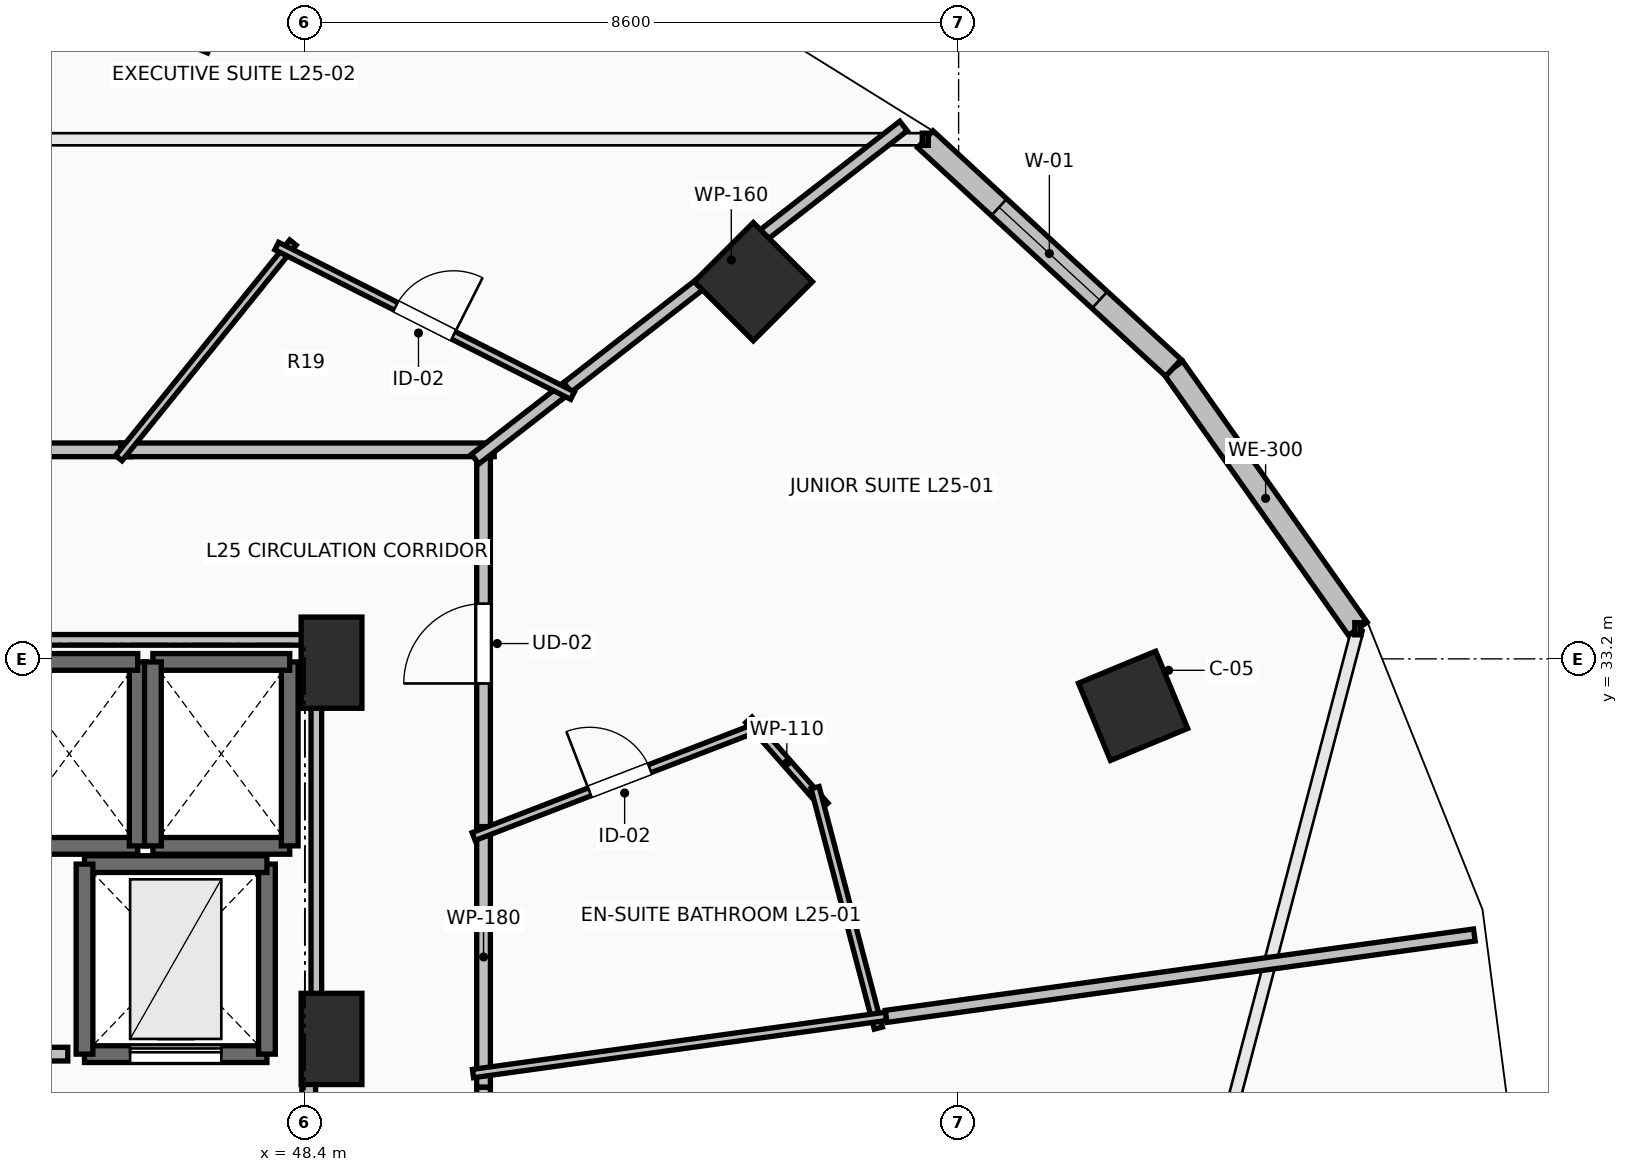
"""IFC4 building model, lengths in metres.
Left out: names, types, materials, properties, quantities, classifications, styles, units other than length and angle.
Written with IfcOpenShell. Run it as: python <this file> out.ifc"""

import sys

from ifc_helpers import new_model, si_unit, direction, frame, frame_2d, origin, origin_2d, place, context, subcontext, project, spatial, rectangle, extrude, element, fill, save


model = new_model("IFC4")
c1 = context("Model", 3, precision=1e-05, world=origin(), true_north=direction((0.0, 1.0)))
c2 = subcontext(c1, "Body", "Model", "MODEL_VIEW")
j1 = project(units=[si_unit("LENGTHUNIT", "METRE"), si_unit("PLANEANGLEUNIT", "RADIAN")], contexts=[c1])
p1 = place(None, origin())
s1 = spatial("IfcSite", under=j1, at=p1, CompositionType="ELEMENT")
p2 = place(p1, origin())
s2 = spatial("IfcBuilding", under=s1, at=p2, CompositionType="ELEMENT")
p3 = place(p2, frame((0.0, 0.0, 96.3)))
s3 = spatial("IfcBuildingStorey", under=s2, at=p3, CompositionType="ELEMENT", Elevation=96.3)
for number, where, z_axis, x_axis in (
    (1, (59.295, 32.582, 0.0), (0.0, 0.0, 1.0), (0.924, 0.383, 0.0)),
    (2, (54.299, 38.162, 0.0), (0.0, 0.0, 1.0), (0.707, 0.707, 0.0)),
    (3, (46.821, 41.891, 0.0), (0.0, 0.0, 1.0), (0.383, 0.924, 0.0)),
):
    element("IfcColumn", number, at=place(p3, frame(where, z_axis=z_axis, x_axis=x_axis)), inside=s3, PredefinedType="COLUMN", context=c2, shape_type="SweptSolid", body=[
        extrude(rectangle(XDim=1.1, YDim=1.1, at=origin_2d()), origin(), (0.0, 0.0, 1.0), 3.5),
    ])
for number, where, z_axis, x_axis in (
    (4, (48.75, 33.15, 0.0), (0.0, 0.0, 1.0), (1.0, 0.0, 0.0)),
    (5, (48.75, 28.2, 0.0), (0.0, 0.0, 1.0), (1.0, 0.0, 0.0)),
):
    element("IfcColumn", number, at=place(p3, frame(where, z_axis=z_axis, x_axis=x_axis)), inside=s3, PredefinedType="PILASTER", context=c2, shape_type="SweptSolid", body=[
        extrude(rectangle(XDim=0.8, YDim=1.2, at=origin_2d()), origin(), (0.0, 0.0, 1.0), 3.5),
    ])
p4 = place(p3, frame((62.252, 33.596, 0.0), z_axis=(0.0, 0.0, 1.0), x_axis=(-0.57716435238, 0.81662801222, 0.0)))
e6 = element("IfcWall", 6, at=p4, inside=s3, PredefinedType="STANDARD", context=c2, shape_type="SweptSolid", body=[
    extrude(rectangle(XDim=4.202, YDim=0.3, at=frame_2d((2.101, 0.0))), origin(), (0.0, 0.0, 1.0), 3.24),
])
p5 = place(p3, frame((59.826, 37.028, 0.0), z_axis=(0.0, 0.0, 1.0), x_axis=(-0.735416718093, 0.677615119924, 0.0)))
e7 = element("IfcWall", 7, at=p5, inside=s3, PredefinedType="STANDARD", context=c2, shape_type="SweptSolid", body=[
    extrude(rectangle(XDim=4.439, YDim=0.3, at=frame_2d((2.22, 0.0))), origin(), (0.0, 0.0, 1.0), 3.24),
])
p6 = place(p5, frame((1.32, 0.0, 0.85)))
e8 = element("IfcOpeningElement", 8, at=p6, cuts=e7, PredefinedType="OPENING", context=c2, shape_type="SweptSolid", body=[
    extrude(rectangle(XDim=1.8, YDim=2.19, at=frame_2d((0.9, 1.095))), frame((0.0, 0.165, 0.0), z_axis=(0.0, -1.0, 0.0), x_axis=(1.0, 0.0, 0.0)), (0.0, 0.0, 1.0), 0.33),
])
p7 = place(p3, frame((44.4, 30.74, 0.0), z_axis=(0.0, 0.0, 1.0), x_axis=(1.0, 0.0, 0.0)))
e9 = element("IfcWall", 9, at=p7, inside=s3, PredefinedType="SOLIDWALL", context=c2, shape_type="SweptSolid", body=[
    extrude(rectangle(XDim=1.8, YDim=0.22, at=frame_2d((0.9, 0.0))), origin(), (0.0, 0.0, 1.0), 3.24),
])
p8 = place(p3, frame((46.2, 30.74, 0.0), z_axis=(0.0, 0.0, 1.0), x_axis=(0.0, 1.0, 0.0)))
e10 = element("IfcWall", 10, at=p8, inside=s3, PredefinedType="SOLIDWALL", context=c2, shape_type="SweptSolid", body=[
    extrude(rectangle(XDim=2.42, YDim=0.22, at=frame_2d((1.21, 0.0))), origin(), (0.0, 0.0, 1.0), 3.24),
])
for number, where, z_axis, x_axis in (
    (11, (46.2, 33.16, 0.0), (0.0, 0.0, 1.0), (-1.0, 0.0, 0.0)),
    (12, (46.4, 30.74, 0.0), (0.0, 0.0, 1.0), (1.0, 0.0, 0.0)),
):
    element("IfcWall", number, at=place(p3, frame(where, z_axis=z_axis, x_axis=x_axis)), inside=s3, PredefinedType="SOLIDWALL", context=c2, shape_type="SweptSolid", body=[
        extrude(rectangle(XDim=1.8, YDim=0.22, at=frame_2d((0.9, 0.0))), origin(), (0.0, 0.0, 1.0), 3.24),
    ])
p9 = place(p3, frame((48.2, 30.74, 0.0), z_axis=(0.0, 0.0, 1.0), x_axis=(0.0, 1.0, 0.0)))
e13 = element("IfcWall", 13, at=p9, inside=s3, PredefinedType="SOLIDWALL", context=c2, shape_type="SweptSolid", body=[
    extrude(rectangle(XDim=2.42, YDim=0.22, at=frame_2d((1.21, 0.0))), origin(), (0.0, 0.0, 1.0), 3.24),
])
p10 = place(p3, frame((48.2, 33.16, 0.0), z_axis=(0.0, 0.0, 1.0), x_axis=(-1.0, 0.0, 0.0)))
e14 = element("IfcWall", 14, at=p10, inside=s3, PredefinedType="SOLIDWALL", context=c2, shape_type="SweptSolid", body=[
    extrude(rectangle(XDim=1.8, YDim=0.22, at=frame_2d((0.9, 0.0))), origin(), (0.0, 0.0, 1.0), 3.24),
])
p11 = place(p3, frame((46.4, 33.16, 0.0), z_axis=(0.0, 0.0, 1.0), x_axis=(0.0, -1.0, 0.0)))
e15 = element("IfcWall", 15, at=p11, inside=s3, PredefinedType="SOLIDWALL", context=c2, shape_type="SweptSolid", body=[
    extrude(rectangle(XDim=2.42, YDim=0.22, at=frame_2d((1.21, 0.0))), origin(), (0.0, 0.0, 1.0), 3.24),
])
p12 = place(p3, frame((45.5, 28.0, 0.0), z_axis=(0.0, 0.0, 1.0), x_axis=(1.0, 0.0, 0.0)))
e16 = element("IfcWall", 16, at=p12, inside=s3, PredefinedType="SHEAR", context=c2, shape_type="SweptSolid", body=[
    extrude(rectangle(XDim=2.4, YDim=0.22, at=frame_2d((1.2, 0.0))), origin(), (0.0, 0.0, 1.0), 3.24),
])
p13 = place(p12, frame((0.6, 0.0, 0.0)))
e17 = element("IfcOpeningElement", 17, at=p13, cuts=e16, PredefinedType="OPENING", context=c2, shape_type="SweptSolid", body=[
    extrude(rectangle(XDim=1.2, YDim=2.2, at=frame_2d((0.6, 1.1))), frame((0.0, 0.125, 0.0), z_axis=(0.0, -1.0, 0.0), x_axis=(1.0, 0.0, 0.0)), (0.0, 0.0, 1.0), 0.25),
])
p14 = place(p3, frame((47.9, 28.0, 0.0), z_axis=(0.0, 0.0, 1.0), x_axis=(0.0, 1.0, 0.0)))
e18 = element("IfcWall", 18, at=p14, inside=s3, PredefinedType="SHEAR", context=c2, shape_type="SweptSolid", body=[
    extrude(rectangle(XDim=2.5, YDim=0.22, at=frame_2d((1.25, 0.0))), origin(), (0.0, 0.0, 1.0), 3.24),
])
p15 = place(p3, frame((47.9, 30.5, 0.0), z_axis=(0.0, 0.0, 1.0), x_axis=(-1.0, 0.0, 0.0)))
e19 = element("IfcWall", 19, at=p15, inside=s3, PredefinedType="SHEAR", context=c2, shape_type="SweptSolid", body=[
    extrude(rectangle(XDim=2.4, YDim=0.22, at=frame_2d((1.2, 0.0))), origin(), (0.0, 0.0, 1.0), 3.24),
])
p16 = place(p3, frame((45.5, 30.5, 0.0), z_axis=(0.0, 0.0, 1.0), x_axis=(0.0, -1.0, 0.0)))
e20 = element("IfcWall", 20, at=p16, inside=s3, PredefinedType="SHEAR", context=c2, shape_type="SweptSolid", body=[
    extrude(rectangle(XDim=2.5, YDim=0.22, at=frame_2d((1.25, 0.0))), origin(), (0.0, 0.0, 1.0), 3.24),
])
p17 = place(p3, frame((48.45, 23.95, 0.0), z_axis=(0.0, 0.0, 1.0), x_axis=(0.0, 1.0, 0.0)))
e21 = element("IfcWall", 21, at=p17, inside=s3, PredefinedType="PARTITIONING", context=c2, shape_type="SweptSolid", body=[
    extrude(rectangle(XDim=4.05, YDim=0.18, at=frame_2d((2.025, 0.0))), origin(), (0.0, 0.0, 1.0), 3.24),
])
p18 = place(p17, frame((1.425, 0.0, 0.0)))
e22 = element("IfcOpeningElement", 22, at=p18, cuts=e21, PredefinedType="OPENING", context=c2, shape_type="SweptSolid", body=[
    extrude(rectangle(XDim=1.2, YDim=2.15, at=frame_2d((0.6, 1.075))), frame((0.0, 0.105, 0.0), z_axis=(0.0, -1.0, 0.0), x_axis=(1.0, 0.0, 0.0)), (0.0, 0.0, 1.0), 0.21),
])
p19 = place(p3, frame((50.75, 30.853, 0.0), z_axis=(0.0, 0.0, 1.0), x_axis=(0.0, 1.0, 0.0)))
e23 = element("IfcWall", 23, at=p19, inside=s3, PredefinedType="PARTITIONING", context=c2, shape_type="SweptSolid", body=[
    extrude(rectangle(XDim=5.097, YDim=0.18, at=frame_2d((2.548, 0.0))), origin(), (0.0, 0.0, 1.0), 2.432),
])
p20 = place(p19, frame((2.023, 0.0, 0.0)))
e24 = element("IfcOpeningElement", 24, at=p20, cuts=e23, PredefinedType="OPENING", context=c2, shape_type="SweptSolid", body=[
    extrude(rectangle(XDim=1.05, YDim=2.2, at=frame_2d((0.525, 1.1))), frame((0.0, 0.105, 0.0), z_axis=(0.0, -1.0, 0.0), x_axis=(1.0, 0.0, 0.0)), (0.0, 0.0, 1.0), 0.21),
])
p21 = place(p3, frame((50.75, 27.564, 0.0), z_axis=(0.0, 0.0, 1.0), x_axis=(0.0, 1.0, 0.0)))
e25 = element("IfcWall", 25, at=p21, inside=s3, PredefinedType="PARTITIONING", context=c2, shape_type="SweptSolid", body=[
    extrude(rectangle(XDim=3.429, YDim=0.18, at=frame_2d((1.714, 0.0))), origin(), (0.0, 0.0, 1.0), 2.432),
])
p22 = place(p3, frame((46.116, 35.95, 0.0), z_axis=(0.0, 0.0, 1.0), x_axis=(-1.0, 0.0, 0.0)))
e26 = element("IfcWall", 26, at=p22, inside=s3, PredefinedType="PARTITIONING", context=c2, shape_type="SweptSolid", body=[
    extrude(rectangle(XDim=4.128, YDim=0.18, at=frame_2d((2.064, 0.0))), origin(), (0.0, 0.0, 1.0), 2.972),
])
p23 = place(p22, frame((1.539, 0.0, 0.0)))
e27 = element("IfcOpeningElement", 27, at=p23, cuts=e26, PredefinedType="OPENING", context=c2, shape_type="SweptSolid", body=[
    extrude(rectangle(XDim=1.05, YDim=2.2, at=frame_2d((0.525, 1.1))), frame((0.0, 0.105, 0.0), z_axis=(0.0, -1.0, 0.0), x_axis=(1.0, 0.0, 0.0)), (0.0, 0.0, 1.0), 0.21),
])
p24 = place(p3, frame((50.89, 35.95, 0.0), z_axis=(0.0, 0.0, 1.0), x_axis=(-1.0, 0.0, 0.0)))
e28 = element("IfcWall", 28, at=p24, inside=s3, PredefinedType="PARTITIONING", context=c2, shape_type="SweptSolid", body=[
    extrude(rectangle(XDim=4.914, YDim=0.18, at=frame_2d((2.457, 0.0))), origin(), (0.0, 0.0, 1.0), 2.432),
])
p25 = place(p3, frame((50.75, 16.409, 0.0), z_axis=(0.0, 0.0, 1.0), x_axis=(0.0, 1.0, 0.0)))
e29 = element("IfcWall", 29, at=p25, inside=s3, PredefinedType="PARTITIONING", context=c2, shape_type="SweptSolid", body=[
    extrude(rectangle(XDim=11.155, YDim=0.18, at=frame_2d((5.578, 0.0))), origin(), (0.0, 0.0, 1.0), 2.432),
])
p26 = place(p25, frame((5.077, 0.0, 0.0)))
e30 = element("IfcOpeningElement", 30, at=p26, cuts=e29, PredefinedType="OPENING", context=c2, shape_type="SweptSolid", body=[
    extrude(rectangle(XDim=1.0, YDim=2.15, at=frame_2d((0.5, 1.075))), frame((0.0, 0.105, 0.0), z_axis=(0.0, -1.0, 0.0), x_axis=(1.0, 0.0, 0.0)), (0.0, 0.0, 1.0), 0.21),
])
p27 = place(p3, frame((54.24, 32.398, 0.0), z_axis=(0.0, 0.0, 1.0), x_axis=(0.661931735756, -0.749564124808, 0.0)))
e31 = element("IfcWall", 31, at=p27, inside=s3, PredefinedType="PARTITIONING", context=c2, shape_type="SweptSolid", body=[
    extrude(rectangle(XDim=1.51, YDim=0.11, at=frame_2d((0.755, 0.0))), origin(), (0.0, 0.0, 1.0), 3.24),
])
p28 = place(p3, frame((55.111, 31.506, 0.0), z_axis=(0.0, 0.0, 1.0), x_axis=(0.254405137241, -0.967097733502, 0.0)))
e32 = element("IfcWall", 32, at=p28, inside=s3, PredefinedType="PARTITIONING", context=c2, shape_type="SweptSolid", body=[
    extrude(rectangle(XDim=3.271, YDim=0.11, at=frame_2d((1.636, 0.0))), origin(), (0.0, 0.0, 1.0), 2.922),
])
p29 = place(p3, frame((56.047, 28.497, 0.0), z_axis=(0.0, 0.0, 1.0), x_axis=(-0.990553307294, -0.137128207927, 0.0)))
e33 = element("IfcWall", 33, at=p29, inside=s3, PredefinedType="PARTITIONING", context=c2, shape_type="SweptSolid", body=[
    extrude(rectangle(XDim=5.487, YDim=0.11, at=frame_2d((2.744, 0.0))), origin(), (0.0, 0.0, 1.0), 2.432),
])
p30 = place(p3, frame((50.619, 30.863, 0.0), z_axis=(0.0, 0.0, 1.0), x_axis=(0.933189718051, 0.359384126144, 0.0)))
e34 = element("IfcWall", 34, at=p30, inside=s3, PredefinedType="PARTITIONING", context=c2, shape_type="SweptSolid", body=[
    extrude(rectangle(XDim=4.119, YDim=0.11, at=frame_2d((2.06, 0.0))), origin(), (0.0, 0.0, 1.0), 2.972),
])
p31 = place(p30, frame((1.635, 0.0, 0.0)))
e35 = element("IfcOpeningElement", 35, at=p31, cuts=e34, PredefinedType="OPENING", context=c2, shape_type="SweptSolid", body=[
    extrude(rectangle(XDim=0.85, YDim=2.1, at=frame_2d((0.425, 1.05))), frame((0.0, 0.07, 0.0), z_axis=(0.0, -1.0, 0.0), x_axis=(1.0, 0.0, 0.0)), (0.0, 0.0, 1.0), 0.14),
])
p32 = place(p3, frame((56.275, 40.21, 0.0), z_axis=(0.0, 0.0, 1.0), x_axis=(-0.78943235806, -0.613837561614, 0.0)))
e36 = element("IfcWall", 36, at=p32, inside=s3, PredefinedType="PARTITIONING", context=c2, shape_type="SweptSolid", body=[
    extrude(rectangle(XDim=5.741, YDim=0.16, at=frame_2d((2.87, 0.0))), origin(), (0.0, 0.0, 1.0), 2.677),
])
p33 = place(p3, frame((51.854, 36.772, 0.0), z_axis=(0.0, 0.0, 1.0), x_axis=(-0.789420593357, -0.613852691436, 0.0)))
e37 = element("IfcWall", 37, at=p33, inside=s3, PredefinedType="PARTITIONING", context=c2, shape_type="SweptSolid", body=[
    extrude(rectangle(XDim=1.538, YDim=0.16, at=frame_2d((0.769, 0.0))), origin(), (0.0, 0.0, 1.0), 2.922),
])
p34 = place(p3, frame((56.047, 28.497, 0.0), z_axis=(0.0, 0.0, 1.0), x_axis=(0.990569127114, 0.137013883997, 0.0)))
e38 = element("IfcWall", 38, at=p34, inside=s3, PredefinedType="PARTITIONING", context=c2, shape_type="SweptSolid", body=[
    extrude(rectangle(XDim=7.812, YDim=0.16, at=frame_2d((3.906, 0.0))), origin(), (0.0, 0.0, 1.0), 2.677),
])
p35 = place(p3, frame((45.951, 35.841, 0.0), z_axis=(0.0, 0.0, 1.0), x_axis=(0.628411924203, 0.77788074505, 0.0)))
e39 = element("IfcWall", 39, at=p35, inside=s3, PredefinedType="PARTITIONING", context=c2, shape_type="SweptSolid", body=[
    extrude(rectangle(XDim=3.646, YDim=0.11, at=frame_2d((1.823, 0.0))), origin(), (0.0, 0.0, 1.0), 2.432),
])
p36 = place(p3, frame((48.029, 38.631, 0.0), z_axis=(0.0, 0.0, 1.0), x_axis=(0.892459125519, -0.451128262558, 0.0)))
e40 = element("IfcWall", 40, at=p36, inside=s3, PredefinedType="PARTITIONING", context=c2, shape_type="SweptSolid", body=[
    extrude(rectangle(XDim=4.361, YDim=0.11, at=frame_2d((2.18, 0.0))), origin(), (0.0, 0.0, 1.0), 3.24),
])
p37 = place(p36, frame((1.755, 0.0, 0.0)))
e41 = element("IfcOpeningElement", 41, at=p37, cuts=e40, PredefinedType="OPENING", context=c2, shape_type="SweptSolid", body=[
    extrude(rectangle(XDim=0.85, YDim=2.1, at=frame_2d((0.425, 1.05))), frame((0.0, 0.07, 0.0), z_axis=(0.0, -1.0, 0.0), x_axis=(1.0, 0.0, 0.0)), (0.0, 0.0, 1.0), 0.14),
])
p38 = place(p3, frame((45.682, 44.88, 0.0), z_axis=(0.0, 0.0, 1.0), x_axis=(-0.376911553655, -0.9262492541, 0.0)))
e42 = element("IfcWall", 42, at=p38, inside=s3, PredefinedType="PARTITIONING", context=c2, shape_type="SweptSolid", body=[
    extrude(rectangle(XDim=9.641, YDim=0.16, at=frame_2d((4.82, 0.0))), origin(), (0.0, 0.0, 1.0), 2.677),
])
p39 = place(p3, frame((45.28, 28.0, 0.0), z_axis=(0.0, 0.0, 1.0), x_axis=(-1.0, 0.0, 0.0)))
e43 = element("IfcWall", 43, at=p39, inside=s3, PredefinedType="PARTITIONING", context=c2, shape_type="SweptSolid", body=[
    extrude(rectangle(XDim=0.915, YDim=0.18, at=frame_2d((0.458, 0.0))), origin(), (0.0, 0.0, 1.0), 3.24),
])
p40 = place(p3, frame((44.34, 33.45, 0.0), z_axis=(0.0, 0.0, 1.0), x_axis=(1.0, 0.0, 0.0)))
e44 = element("IfcWall", 44, at=p40, inside=s3, PredefinedType="PARTITIONING", context=c2, shape_type="SweptSolid", body=[
    extrude(rectangle(XDim=4.21, YDim=0.14, at=frame_2d((2.105, 0.0))), origin(), (0.0, 0.0, 1.0), 2.432),
])
p41 = place(p3, frame((48.55, 33.45, 0.0), z_axis=(0.0, 0.0, 1.0), x_axis=(0.0, -1.0, 0.0)))
e45 = element("IfcWall", 45, at=p41, inside=s3, PredefinedType="PARTITIONING", context=c2, shape_type="SweptSolid", body=[
    extrude(rectangle(XDim=5.254, YDim=0.14, at=frame_2d((2.627, 0.0))), origin(), (0.0, 0.0, 1.0), 2.432),
])
p42 = place(p6, origin())
e46 = element("IfcWindow", 46, at=p42, inside=s3, PartitioningType="SINGLE_PANEL", PredefinedType="WINDOW", context=c2, shape_type="SweptSolid", body=[
    extrude(rectangle(XDim=1.8, YDim=2.19, at=frame_2d((0.9, 1.095))), frame((0.0, 0.03, 0.0), z_axis=(0.0, -1.0, 0.0), x_axis=(1.0, 0.0, 0.0)), (0.0, 0.0, 1.0), 0.06),
])
fill(e8, e46)
p43 = place(p13, origin())
e47 = element("IfcDoor", 47, at=p43, inside=s3, OperationType="SLIDING_TO_LEFT", PredefinedType="DOOR", context=c2, shape_type="SweptSolid", body=[
    extrude(rectangle(XDim=1.2, YDim=2.2, at=frame_2d((0.6, 1.1))), frame((0.0, 0.025, 0.0), z_axis=(0.0, -1.0, 0.0), x_axis=(1.0, 0.0, 0.0)), (0.0, 0.0, 1.0), 0.05),
])
fill(e17, e47)
p44 = place(p20, origin())
e48 = element("IfcDoor", 48, at=p44, inside=s3, OperationType="SINGLE_SWING_LEFT", PredefinedType="DOOR", context=c2, shape_type="SweptSolid", body=[
    extrude(rectangle(XDim=1.05, YDim=2.2, at=frame_2d((0.525, 1.1))), frame((0.0, 0.025, 0.0), z_axis=(0.0, -1.0, 0.0), x_axis=(1.0, 0.0, 0.0)), (0.0, 0.0, 1.0), 0.05),
])
fill(e24, e48)
p45 = place(p31, origin())
e49 = element("IfcDoor", 49, at=p45, inside=s3, OperationType="SINGLE_SWING_LEFT", PredefinedType="DOOR", context=c2, shape_type="SweptSolid", body=[
    extrude(rectangle(XDim=0.85, YDim=2.1, at=frame_2d((0.425, 1.05))), frame((0.0, 0.025, 0.0), z_axis=(0.0, -1.0, 0.0), x_axis=(1.0, 0.0, 0.0)), (0.0, 0.0, 1.0), 0.05),
])
fill(e35, e49)
p46 = place(p37, origin())
e50 = element("IfcDoor", 50, at=p46, inside=s3, OperationType="SINGLE_SWING_RIGHT", PredefinedType="DOOR", context=c2, shape_type="SweptSolid", body=[
    extrude(rectangle(XDim=0.85, YDim=2.1, at=frame_2d((0.425, 1.05))), frame((0.0, 0.025, 0.0), z_axis=(0.0, -1.0, 0.0), x_axis=(1.0, 0.0, 0.0)), (0.0, 0.0, 1.0), 0.05),
])
fill(e41, e50)
save(model, sys.argv[1])
